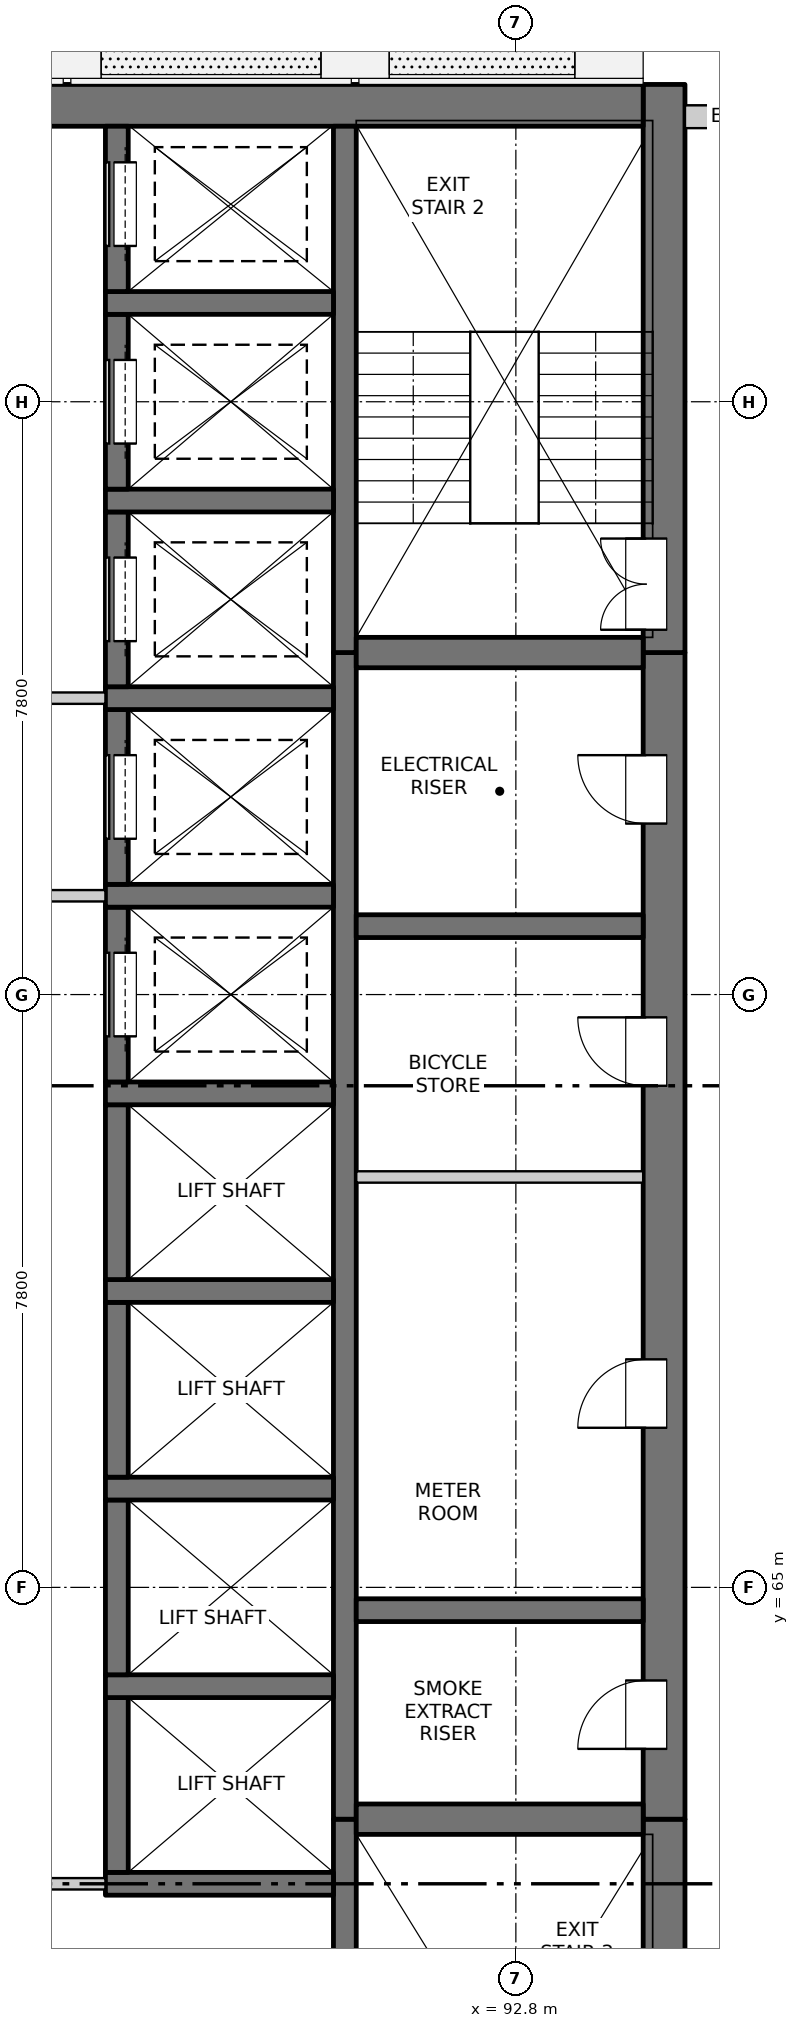
"""IFC4 building model, lengths in metres.
Left out: names, types, materials, properties, quantities, classifications, styles, units other than length and angle.
Written with IfcOpenShell. Run it as: python <this file> out.ifc"""

import sys

from ifc_helpers import new_model, si_unit, direction, frame, frame_2d, origin, place, context, subcontext, project, spatial, rectangle, extrude, element, fill, save


model = new_model("IFC4")
c1 = context("Model", 3, precision=1e-05, world=origin(), true_north=direction((0.0, 1.0)))
c2 = subcontext(c1, "Body", "Model", "MODEL_VIEW")
j1 = project(units=[si_unit("LENGTHUNIT", "METRE"), si_unit("PLANEANGLEUNIT", "RADIAN")], contexts=[c1])
p1 = place(None, origin())
s1 = spatial("IfcSite", under=j1, at=p1, CompositionType="ELEMENT")
p2 = place(p1, origin())
s2 = spatial("IfcBuilding", under=s1, at=p2, CompositionType="ELEMENT")
p3 = place(p2, frame((0.0, 0.0, 137.3)))
s3 = spatial("IfcBuildingStorey", under=s2, at=p3, CompositionType="ELEMENT", Elevation=137.3)
p4 = place(p3, frame((94.75, 54.975, -0.25), z_axis=(0.0, 0.0, 1.0), x_axis=(0.0, 1.0, 0.0)))
e1 = element("IfcWall", 1, at=p4, inside=s3, PredefinedType="SOLIDWALL", context=c2, shape_type="SweptSolid", body=[
    extrude(rectangle(XDim=6.975, YDim=0.55, at=frame_2d((3.487, 0.0))), origin(), (0.0, 0.0, 1.0), 3.4),
])
p5 = place(p4, frame((0.675, 0.0, 0.25)))
e2 = element("IfcOpeningElement", 2, at=p5, cuts=e1, PredefinedType="OPENING", context=c2, shape_type="SweptSolid", body=[
    extrude(rectangle(XDim=1.2, YDim=2.1, at=frame_2d((0.6, 1.05))), frame((0.0, 0.285, 0.0), z_axis=(0.0, -1.0, 0.0), x_axis=(1.0, 0.0, 0.0)), (0.0, 0.0, 1.0), 0.57),
])
p6 = place(p3, frame((94.75, 61.95, -0.25), z_axis=(0.0, 0.0, 1.0), x_axis=(0.0, 1.0, 0.0)))
e3 = element("IfcWall", 3, at=p6, inside=s3, PredefinedType="SOLIDWALL", context=c2, shape_type="SweptSolid", body=[
    extrude(rectangle(XDim=15.35, YDim=0.55, at=frame_2d((7.675, 0.0))), origin(), (0.0, 0.0, 1.0), 3.4),
])
p7 = place(p6, frame((0.925, 0.0, 0.25)))
e4 = element("IfcOpeningElement", 4, at=p7, cuts=e3, PredefinedType="OPENING", context=c2, shape_type="SweptSolid", body=[
    extrude(rectangle(XDim=0.9, YDim=2.1, at=frame_2d((0.45, 1.05))), frame((0.0, 0.285, 0.0), z_axis=(0.0, -1.0, 0.0), x_axis=(1.0, 0.0, 0.0)), (0.0, 0.0, 1.0), 0.57),
])
p8 = place(p6, frame((5.15, 0.0, 0.25)))
e5 = element("IfcOpeningElement", 5, at=p8, cuts=e3, PredefinedType="OPENING", context=c2, shape_type="SweptSolid", body=[
    extrude(rectangle(XDim=0.9, YDim=2.1, at=frame_2d((0.45, 1.05))), frame((0.0, 0.285, 0.0), z_axis=(0.0, -1.0, 0.0), x_axis=(1.0, 0.0, 0.0)), (0.0, 0.0, 1.0), 0.57),
])
p9 = place(p6, frame((9.65, 0.0, 0.25)))
e6 = element("IfcOpeningElement", 6, at=p9, cuts=e3, PredefinedType="OPENING", context=c2, shape_type="SweptSolid", body=[
    extrude(rectangle(XDim=0.9, YDim=2.1, at=frame_2d((0.45, 1.05))), frame((0.0, 0.285, 0.0), z_axis=(0.0, -1.0, 0.0), x_axis=(1.0, 0.0, 0.0)), (0.0, 0.0, 1.0), 0.57),
])
p10 = place(p6, frame((13.1, 0.0, 0.25)))
e7 = element("IfcOpeningElement", 7, at=p10, cuts=e3, PredefinedType="OPENING", context=c2, shape_type="SweptSolid", body=[
    extrude(rectangle(XDim=0.9, YDim=2.1, at=frame_2d((0.45, 1.05))), frame((0.0, 0.285, 0.0), z_axis=(0.0, -1.0, 0.0), x_axis=(1.0, 0.0, 0.0)), (0.0, 0.0, 1.0), 0.57),
])
p11 = place(p3, frame((94.75, 77.3, -0.25), z_axis=(0.0, 0.0, 1.0), x_axis=(0.0, 1.0, 0.0)))
e8 = element("IfcWall", 8, at=p11, inside=s3, PredefinedType="SOLIDWALL", context=c2, shape_type="SweptSolid", body=[
    extrude(rectangle(XDim=7.475, YDim=0.55, at=frame_2d((3.737, 0.0))), origin(), (0.0, 0.0, 1.0), 3.4),
])
p12 = place(p11, frame((0.3, 0.0, 0.25)))
e9 = element("IfcOpeningElement", 9, at=p12, cuts=e8, PredefinedType="OPENING", context=c2, shape_type="SweptSolid", body=[
    extrude(rectangle(XDim=1.2, YDim=2.1, at=frame_2d((0.6, 1.05))), frame((0.0, 0.285, 0.0), z_axis=(0.0, -1.0, 0.0), x_axis=(1.0, 0.0, 0.0)), (0.0, 0.0, 1.0), 0.57),
])
p13 = place(p3, frame((75.525, 84.5, -0.25), z_axis=(0.0, 0.0, 1.0), x_axis=(1.0, 0.0, 0.0)))
e10 = element("IfcWall", 10, at=p13, inside=s3, PredefinedType="SOLIDWALL", context=c2, shape_type="SweptSolid", body=[
    extrude(rectangle(XDim=18.95, YDim=0.55, at=frame_2d((9.475, 0.0))), origin(), (0.0, 0.0, 1.0), 3.4),
])
p14 = place(p3, frame((90.55, 55.525, -0.25), z_axis=(0.0, 0.0, 1.0), x_axis=(0.0, 1.0, 0.0)))
e11 = element("IfcWall", 11, at=p14, inside=s3, PredefinedType="SOLIDWALL", context=c2, shape_type="SweptSolid", body=[
    extrude(rectangle(XDim=6.425, YDim=0.3, at=frame_2d((3.212, 0.0))), origin(), (0.0, 0.0, 1.0), 3.4),
])
p15 = place(p14, frame((0.125, 0.0, 0.25)))
e12 = element("IfcOpeningElement", 12, at=p15, cuts=e11, PredefinedType="OPENING", context=c2, shape_type="SweptSolid", body=[
    extrude(rectangle(XDim=1.2, YDim=2.1, at=frame_2d((0.6, 1.05))), frame((0.0, 0.16, 0.0), z_axis=(0.0, -1.0, 0.0), x_axis=(1.0, 0.0, 0.0)), (0.0, 0.0, 1.0), 0.32),
])
p16 = place(p3, frame((90.55, 61.95, -0.25), z_axis=(0.0, 0.0, 1.0), x_axis=(0.0, 1.0, 0.0)))
e13 = element("IfcWall", 13, at=p16, inside=s3, PredefinedType="SOLIDWALL", context=c2, shape_type="SweptSolid", body=[
    extrude(rectangle(XDim=15.35, YDim=0.3, at=frame_2d((7.675, 0.0))), origin(), (0.0, 0.0, 1.0), 3.4),
])
p17 = place(p3, frame((90.55, 77.3, -0.25), z_axis=(0.0, 0.0, 1.0), x_axis=(0.0, 1.0, 0.0)))
e14 = element("IfcWall", 14, at=p17, inside=s3, PredefinedType="SOLIDWALL", context=c2, shape_type="SweptSolid", body=[
    extrude(rectangle(XDim=6.925, YDim=0.3, at=frame_2d((3.462, 0.0))), origin(), (0.0, 0.0, 1.0), 3.4),
])
p18 = place(p3, frame((87.4, 61.1, -0.25), z_axis=(0.0, 0.0, 1.0), x_axis=(1.0, 0.0, 0.0)))
e15 = element("IfcWall", 15, at=p18, inside=s3, PredefinedType="SOLIDWALL", context=c2, shape_type="SweptSolid", body=[
    extrude(rectangle(XDim=3.0, YDim=0.3, at=frame_2d((1.5, 0.0))), origin(), (0.0, 0.0, 1.0), 3.4),
])
p19 = place(p3, frame((87.55, 61.25, -0.25), z_axis=(0.0, 0.0, 1.0), x_axis=(0.0, 1.0, 0.0)))
e16 = element("IfcWall", 16, at=p19, inside=s3, PredefinedType="SOLIDWALL", context=c2, shape_type="SweptSolid", body=[
    extrude(rectangle(XDim=2.3, YDim=0.3, at=frame_2d((1.15, 0.0))), origin(), (0.0, 0.0, 1.0), 3.4),
])
p20 = place(p3, frame((87.4, 63.7, -0.25), z_axis=(0.0, 0.0, 1.0), x_axis=(1.0, 0.0, 0.0)))
e17 = element("IfcWall", 17, at=p20, inside=s3, PredefinedType="SOLIDWALL", context=c2, shape_type="SweptSolid", body=[
    extrude(rectangle(XDim=3.0, YDim=0.3, at=frame_2d((1.5, 0.0))), origin(), (0.0, 0.0, 1.0), 3.4),
])
p21 = place(p3, frame((87.55, 63.85, -0.25), z_axis=(0.0, 0.0, 1.0), x_axis=(0.0, 1.0, 0.0)))
e18 = element("IfcWall", 18, at=p21, inside=s3, PredefinedType="SOLIDWALL", context=c2, shape_type="SweptSolid", body=[
    extrude(rectangle(XDim=2.3, YDim=0.3, at=frame_2d((1.15, 0.0))), origin(), (0.0, 0.0, 1.0), 3.4),
])
p22 = place(p3, frame((87.4, 66.3, -0.25), z_axis=(0.0, 0.0, 1.0), x_axis=(1.0, 0.0, 0.0)))
e19 = element("IfcWall", 19, at=p22, inside=s3, PredefinedType="SOLIDWALL", context=c2, shape_type="SweptSolid", body=[
    extrude(rectangle(XDim=3.0, YDim=0.3, at=frame_2d((1.5, 0.0))), origin(), (0.0, 0.0, 1.0), 3.4),
])
p23 = place(p3, frame((87.55, 66.45, -0.25), z_axis=(0.0, 0.0, 1.0), x_axis=(0.0, 1.0, 0.0)))
e20 = element("IfcWall", 20, at=p23, inside=s3, PredefinedType="SOLIDWALL", context=c2, shape_type="SweptSolid", body=[
    extrude(rectangle(XDim=2.3, YDim=0.3, at=frame_2d((1.15, 0.0))), origin(), (0.0, 0.0, 1.0), 3.4),
])
p24 = place(p3, frame((87.4, 68.9, -0.25), z_axis=(0.0, 0.0, 1.0), x_axis=(1.0, 0.0, 0.0)))
e21 = element("IfcWall", 21, at=p24, inside=s3, PredefinedType="SOLIDWALL", context=c2, shape_type="SweptSolid", body=[
    extrude(rectangle(XDim=3.0, YDim=0.3, at=frame_2d((1.5, 0.0))), origin(), (0.0, 0.0, 1.0), 3.4),
])
p25 = place(p3, frame((87.55, 69.05, -0.25), z_axis=(0.0, 0.0, 1.0), x_axis=(0.0, 1.0, 0.0)))
e22 = element("IfcWall", 22, at=p25, inside=s3, PredefinedType="SOLIDWALL", context=c2, shape_type="SweptSolid", body=[
    extrude(rectangle(XDim=2.3, YDim=0.3, at=frame_2d((1.15, 0.0))), origin(), (0.0, 0.0, 1.0), 3.4),
])
p26 = place(p3, frame((87.4, 71.5, -0.25), z_axis=(0.0, 0.0, 1.0), x_axis=(1.0, 0.0, 0.0)))
e23 = element("IfcWall", 23, at=p26, inside=s3, PredefinedType="SOLIDWALL", context=c2, shape_type="SweptSolid", body=[
    extrude(rectangle(XDim=3.0, YDim=0.3, at=frame_2d((1.5, 0.0))), origin(), (0.0, 0.0, 1.0), 3.4),
])
p27 = place(p3, frame((87.55, 71.65, -0.25), z_axis=(0.0, 0.0, 1.0), x_axis=(0.0, 1.0, 0.0)))
e24 = element("IfcWall", 24, at=p27, inside=s3, PredefinedType="SOLIDWALL", context=c2, shape_type="SweptSolid", body=[
    extrude(rectangle(XDim=2.3, YDim=0.3, at=frame_2d((1.15, 0.0))), origin(), (0.0, 0.0, 1.0), 3.4),
])
p28 = place(p27, frame((0.6, 0.0, 0.25)))
e25 = element("IfcOpeningElement", 25, at=p28, cuts=e24, PredefinedType="OPENING", context=c2, shape_type="SweptSolid", body=[
    extrude(rectangle(XDim=1.1, YDim=2.1, at=frame_2d((0.55, 1.05))), frame((0.0, 0.16, 0.0), z_axis=(0.0, -1.0, 0.0), x_axis=(1.0, 0.0, 0.0)), (0.0, 0.0, 1.0), 0.32),
])
p29 = place(p3, frame((87.4, 74.1, -0.25), z_axis=(0.0, 0.0, 1.0), x_axis=(1.0, 0.0, 0.0)))
e26 = element("IfcWall", 26, at=p29, inside=s3, PredefinedType="SOLIDWALL", context=c2, shape_type="SweptSolid", body=[
    extrude(rectangle(XDim=3.0, YDim=0.3, at=frame_2d((1.5, 0.0))), origin(), (0.0, 0.0, 1.0), 3.4),
])
p30 = place(p3, frame((87.55, 74.25, -0.25), z_axis=(0.0, 0.0, 1.0), x_axis=(0.0, 1.0, 0.0)))
e27 = element("IfcWall", 27, at=p30, inside=s3, PredefinedType="SOLIDWALL", context=c2, shape_type="SweptSolid", body=[
    extrude(rectangle(XDim=2.3, YDim=0.3, at=frame_2d((1.15, 0.0))), origin(), (0.0, 0.0, 1.0), 3.4),
])
p31 = place(p30, frame((0.6, 0.0, 0.25)))
e28 = element("IfcOpeningElement", 28, at=p31, cuts=e27, PredefinedType="OPENING", context=c2, shape_type="SweptSolid", body=[
    extrude(rectangle(XDim=1.1, YDim=2.1, at=frame_2d((0.55, 1.05))), frame((0.0, 0.16, 0.0), z_axis=(0.0, -1.0, 0.0), x_axis=(1.0, 0.0, 0.0)), (0.0, 0.0, 1.0), 0.32),
])
p32 = place(p3, frame((87.4, 76.7, -0.25), z_axis=(0.0, 0.0, 1.0), x_axis=(1.0, 0.0, 0.0)))
e29 = element("IfcWall", 29, at=p32, inside=s3, PredefinedType="SOLIDWALL", context=c2, shape_type="SweptSolid", body=[
    extrude(rectangle(XDim=3.0, YDim=0.3, at=frame_2d((1.5, 0.0))), origin(), (0.0, 0.0, 1.0), 3.4),
])
p33 = place(p3, frame((87.55, 76.85, -0.25), z_axis=(0.0, 0.0, 1.0), x_axis=(0.0, 1.0, 0.0)))
e30 = element("IfcWall", 30, at=p33, inside=s3, PredefinedType="SOLIDWALL", context=c2, shape_type="SweptSolid", body=[
    extrude(rectangle(XDim=2.3, YDim=0.3, at=frame_2d((1.15, 0.0))), origin(), (0.0, 0.0, 1.0), 3.4),
])
p34 = place(p33, frame((0.6, 0.0, 0.25)))
e31 = element("IfcOpeningElement", 31, at=p34, cuts=e30, PredefinedType="OPENING", context=c2, shape_type="SweptSolid", body=[
    extrude(rectangle(XDim=1.1, YDim=2.1, at=frame_2d((0.55, 1.05))), frame((0.0, 0.16, 0.0), z_axis=(0.0, -1.0, 0.0), x_axis=(1.0, 0.0, 0.0)), (0.0, 0.0, 1.0), 0.32),
])
p35 = place(p3, frame((87.4, 79.3, -0.25), z_axis=(0.0, 0.0, 1.0), x_axis=(1.0, 0.0, 0.0)))
e32 = element("IfcWall", 32, at=p35, inside=s3, PredefinedType="SOLIDWALL", context=c2, shape_type="SweptSolid", body=[
    extrude(rectangle(XDim=3.0, YDim=0.3, at=frame_2d((1.5, 0.0))), origin(), (0.0, 0.0, 1.0), 3.4),
])
p36 = place(p3, frame((87.55, 79.45, -0.25), z_axis=(0.0, 0.0, 1.0), x_axis=(0.0, 1.0, 0.0)))
e33 = element("IfcWall", 33, at=p36, inside=s3, PredefinedType="SOLIDWALL", context=c2, shape_type="SweptSolid", body=[
    extrude(rectangle(XDim=2.3, YDim=0.3, at=frame_2d((1.15, 0.0))), origin(), (0.0, 0.0, 1.0), 3.4),
])
p37 = place(p36, frame((0.6, 0.0, 0.25)))
e34 = element("IfcOpeningElement", 34, at=p37, cuts=e33, PredefinedType="OPENING", context=c2, shape_type="SweptSolid", body=[
    extrude(rectangle(XDim=1.1, YDim=2.1, at=frame_2d((0.55, 1.05))), frame((0.0, 0.16, 0.0), z_axis=(0.0, -1.0, 0.0), x_axis=(1.0, 0.0, 0.0)), (0.0, 0.0, 1.0), 0.32),
])
p38 = place(p3, frame((87.4, 81.9, -0.25), z_axis=(0.0, 0.0, 1.0), x_axis=(1.0, 0.0, 0.0)))
e35 = element("IfcWall", 35, at=p38, inside=s3, PredefinedType="SOLIDWALL", context=c2, shape_type="SweptSolid", body=[
    extrude(rectangle(XDim=3.0, YDim=0.3, at=frame_2d((1.5, 0.0))), origin(), (0.0, 0.0, 1.0), 3.4),
])
p39 = place(p3, frame((87.55, 82.05, -0.25), z_axis=(0.0, 0.0, 1.0), x_axis=(0.0, 1.0, 0.0)))
e36 = element("IfcWall", 36, at=p39, inside=s3, PredefinedType="SOLIDWALL", context=c2, shape_type="SweptSolid", body=[
    extrude(rectangle(XDim=2.175, YDim=0.3, at=frame_2d((1.087, 0.0))), origin(), (0.0, 0.0, 1.0), 3.4),
])
p40 = place(p39, frame((0.6, 0.0, 0.25)))
e37 = element("IfcOpeningElement", 37, at=p40, cuts=e36, PredefinedType="OPENING", context=c2, shape_type="SweptSolid", body=[
    extrude(rectangle(XDim=1.1, YDim=2.1, at=frame_2d((0.55, 1.05))), frame((0.0, 0.16, 0.0), z_axis=(0.0, -1.0, 0.0), x_axis=(1.0, 0.0, 0.0)), (0.0, 0.0, 1.0), 0.32),
])
p41 = place(p3, frame((90.7, 61.95, -0.25), z_axis=(0.0, 0.0, 1.0), x_axis=(1.0, 0.0, 0.0)))
e38 = element("IfcWall", 38, at=p41, inside=s3, PredefinedType="SOLIDWALL", context=c2, shape_type="SweptSolid", body=[
    extrude(rectangle(XDim=3.775, YDim=0.4, at=frame_2d((1.888, 0.0))), origin(), (0.0, 0.0, 1.0), 3.4),
])
for number, where, z_axis, x_axis in (
    (39, (90.7, 64.7, -0.25), (0.0, 0.0, 1.0), (1.0, 0.0, 0.0)),
    (40, (90.7, 73.7, -0.25), (0.0, 0.0, 1.0), (1.0, 0.0, 0.0)),
):
    element("IfcWall", number, at=place(p3, frame(where, z_axis=z_axis, x_axis=x_axis)), inside=s3, PredefinedType="SOLIDWALL", context=c2, shape_type="SweptSolid", body=[
        extrude(rectangle(XDim=3.775, YDim=0.3, at=frame_2d((1.888, 0.0))), origin(), (0.0, 0.0, 1.0), 3.4),
    ])
p42 = place(p3, frame((90.7, 77.3, -0.25), z_axis=(0.0, 0.0, 1.0), x_axis=(1.0, 0.0, 0.0)))
e41 = element("IfcWall", 41, at=p42, inside=s3, PredefinedType="SOLIDWALL", context=c2, shape_type="SweptSolid", body=[
    extrude(rectangle(XDim=3.775, YDim=0.4, at=frame_2d((1.888, 0.0))), origin(), (0.0, 0.0, 1.0), 3.4),
])
p43 = place(p3, frame((95.025, 84.35, 0.0), z_axis=(0.0, 0.0, 1.0), x_axis=(1.0, 0.0, 0.0)))
e42 = element("IfcWall", 42, at=p43, inside=s3, PredefinedType="SOLIDWALL", context=c2, shape_type="SweptSolid", body=[
    extrude(rectangle(XDim=1.25, YDim=0.3, at=frame_2d((0.625, 0.0))), origin(), (0.0, 0.0, 1.0), 2.7),
])
p44 = place(p3, frame((82.6, 61.1, 0.0), z_axis=(0.0, 0.0, 1.0), x_axis=(1.0, 0.0, 0.0)))
e43 = element("IfcWall", 43, at=p44, inside=s3, PredefinedType="PARTITIONING", context=c2, shape_type="SweptSolid", body=[
    extrude(rectangle(XDim=4.8, YDim=0.15, at=frame_2d((2.4, 0.0))), origin(), (0.0, 0.0, 1.0), 3.15),
])
p45 = place(p44, frame((1.5, 0.0, 0.0)))
e44 = element("IfcOpeningElement", 44, at=p45, cuts=e43, PredefinedType="OPENING", context=c2, shape_type="SweptSolid", body=[
    extrude(rectangle(XDim=1.8, YDim=2.1, at=frame_2d((0.9, 1.05))), frame((0.0, 0.085, 0.0), z_axis=(0.0, -1.0, 0.0), x_axis=(1.0, 0.0, 0.0)), (0.0, 0.0, 1.0), 0.17),
])
p46 = place(p3, frame((90.7, 70.4, 0.0), z_axis=(0.0, 0.0, 1.0), x_axis=(1.0, 0.0, 0.0)))
e45 = element("IfcWall", 45, at=p46, inside=s3, PredefinedType="PARTITIONING", context=c2, shape_type="SweptSolid", body=[
    extrude(rectangle(XDim=3.775, YDim=0.15, at=frame_2d((1.887, 0.0))), origin(), (0.0, 0.0, 1.0), 3.15),
])
p47 = place(p3, frame((82.6, 74.1, 0.0), z_axis=(0.0, 0.0, 1.0), x_axis=(1.0, 0.0, 0.0)))
e46 = element("IfcWall", 46, at=p47, inside=s3, PredefinedType="PARTITIONING", context=c2, shape_type="SweptSolid", body=[
    extrude(rectangle(XDim=4.8, YDim=0.15, at=frame_2d((2.4, 0.0))), origin(), (0.0, 0.0, 1.0), 3.15),
])
p48 = place(p47, frame((1.5, 0.0, 0.0)))
e47 = element("IfcOpeningElement", 47, at=p48, cuts=e46, PredefinedType="OPENING", context=c2, shape_type="SweptSolid", body=[
    extrude(rectangle(XDim=1.8, YDim=2.1, at=frame_2d((0.9, 1.05))), frame((0.0, 0.085, 0.0), z_axis=(0.0, -1.0, 0.0), x_axis=(1.0, 0.0, 0.0)), (0.0, 0.0, 1.0), 0.17),
])
p49 = place(p3, frame((82.6, 76.7, 0.0), z_axis=(0.0, 0.0, 1.0), x_axis=(1.0, 0.0, 0.0)))
e48 = element("IfcWall", 48, at=p49, inside=s3, PredefinedType="PARTITIONING", context=c2, shape_type="SweptSolid", body=[
    extrude(rectangle(XDim=4.8, YDim=0.15, at=frame_2d((2.4, 0.0))), origin(), (0.0, 0.0, 1.0), 3.15),
])
p50 = place(p49, frame((1.5, 0.0, 0.0)))
e49 = element("IfcOpeningElement", 49, at=p50, cuts=e48, PredefinedType="OPENING", context=c2, shape_type="SweptSolid", body=[
    extrude(rectangle(XDim=1.8, YDim=2.1, at=frame_2d((0.9, 1.05))), frame((0.0, 0.085, 0.0), z_axis=(0.0, -1.0, 0.0), x_axis=(1.0, 0.0, 0.0)), (0.0, 0.0, 1.0), 0.17),
])
p51 = place(p7, origin())
e50 = element("IfcDoor", 50, at=p51, inside=s3, OperationType="SINGLE_SWING_LEFT", PredefinedType="DOOR", context=c2, shape_type="SweptSolid", body=[
    extrude(rectangle(XDim=0.9, YDim=2.1, at=frame_2d((0.45, 1.05))), frame((0.0, 0.26, 0.0), z_axis=(0.0, -1.0, 0.0), x_axis=(1.0, 0.0, 0.0)), (0.0, 0.0, 1.0), 0.05),
])
fill(e4, e50)
p52 = place(p8, origin())
e51 = element("IfcDoor", 51, at=p52, inside=s3, OperationType="SINGLE_SWING_LEFT", PredefinedType="DOOR", context=c2, shape_type="SweptSolid", body=[
    extrude(rectangle(XDim=0.9, YDim=2.1, at=frame_2d((0.45, 1.05))), frame((0.0, 0.26, 0.0), z_axis=(0.0, -1.0, 0.0), x_axis=(1.0, 0.0, 0.0)), (0.0, 0.0, 1.0), 0.05),
])
fill(e5, e51)
p53 = place(p9, origin())
e52 = element("IfcDoor", 52, at=p53, inside=s3, OperationType="SINGLE_SWING_RIGHT", PredefinedType="DOOR", context=c2, shape_type="SweptSolid", body=[
    extrude(rectangle(XDim=0.9, YDim=2.1, at=frame_2d((0.45, 1.05))), frame((0.0, 0.26, 0.0), z_axis=(0.0, -1.0, 0.0), x_axis=(1.0, 0.0, 0.0)), (0.0, 0.0, 1.0), 0.05),
])
fill(e6, e52)
p54 = place(p28, origin())
e53 = element("IfcDoor", 53, at=p54, inside=s3, OperationType="SLIDING_TO_LEFT", PredefinedType="DOOR", context=c2, shape_type="SweptSolid", body=[
    extrude(rectangle(XDim=1.1, YDim=2.1, at=frame_2d((0.55, 1.05))), frame((0.0, -0.085, 0.0), z_axis=(0.0, -1.0, 0.0), x_axis=(1.0, 0.0, 0.0)), (0.0, 0.0, 1.0), 0.05),
])
fill(e25, e53)
p55 = place(p31, origin())
e54 = element("IfcDoor", 54, at=p55, inside=s3, OperationType="SLIDING_TO_LEFT", PredefinedType="DOOR", context=c2, shape_type="SweptSolid", body=[
    extrude(rectangle(XDim=1.1, YDim=2.1, at=frame_2d((0.55, 1.05))), frame((0.0, -0.085, 0.0), z_axis=(0.0, -1.0, 0.0), x_axis=(1.0, 0.0, 0.0)), (0.0, 0.0, 1.0), 0.05),
])
fill(e28, e54)
p56 = place(p10, origin())
e55 = element("IfcDoor", 55, at=p56, inside=s3, OperationType="SINGLE_SWING_RIGHT", PredefinedType="DOOR", context=c2, shape_type="SweptSolid", body=[
    extrude(rectangle(XDim=0.9, YDim=2.1, at=frame_2d((0.45, 1.05))), frame((0.0, 0.26, 0.0), z_axis=(0.0, -1.0, 0.0), x_axis=(1.0, 0.0, 0.0)), (0.0, 0.0, 1.0), 0.05),
])
fill(e7, e55)
p57 = place(p34, origin())
e56 = element("IfcDoor", 56, at=p57, inside=s3, OperationType="SLIDING_TO_LEFT", PredefinedType="DOOR", context=c2, shape_type="SweptSolid", body=[
    extrude(rectangle(XDim=1.1, YDim=2.1, at=frame_2d((0.55, 1.05))), frame((0.0, -0.085, 0.0), z_axis=(0.0, -1.0, 0.0), x_axis=(1.0, 0.0, 0.0)), (0.0, 0.0, 1.0), 0.05),
])
fill(e31, e56)
p58 = place(p12, origin())
e57 = element("IfcDoor", 57, at=p58, inside=s3, OperationType="DOUBLE_DOOR_SINGLE_SWING", PredefinedType="DOOR", context=c2, shape_type="SweptSolid", body=[
    extrude(rectangle(XDim=1.2, YDim=2.1, at=frame_2d((0.6, 1.05))), frame((0.0, 0.26, 0.0), z_axis=(0.0, -1.0, 0.0), x_axis=(1.0, 0.0, 0.0)), (0.0, 0.0, 1.0), 0.05),
])
fill(e9, e57)
p59 = place(p37, origin())
e58 = element("IfcDoor", 58, at=p59, inside=s3, OperationType="SLIDING_TO_RIGHT", PredefinedType="DOOR", context=c2, shape_type="SweptSolid", body=[
    extrude(rectangle(XDim=1.1, YDim=2.1, at=frame_2d((0.55, 1.05))), frame((0.0, -0.085, 0.0), z_axis=(0.0, -1.0, 0.0), x_axis=(1.0, 0.0, 0.0)), (0.0, 0.0, 1.0), 0.05),
])
fill(e34, e58)
p60 = place(p40, origin())
e59 = element("IfcDoor", 59, at=p60, inside=s3, OperationType="SLIDING_TO_RIGHT", PredefinedType="DOOR", context=c2, shape_type="SweptSolid", body=[
    extrude(rectangle(XDim=1.1, YDim=2.1, at=frame_2d((0.55, 1.05))), frame((0.0, -0.085, 0.0), z_axis=(0.0, -1.0, 0.0), x_axis=(1.0, 0.0, 0.0)), (0.0, 0.0, 1.0), 0.05),
])
fill(e37, e59)
save(model, sys.argv[1])
